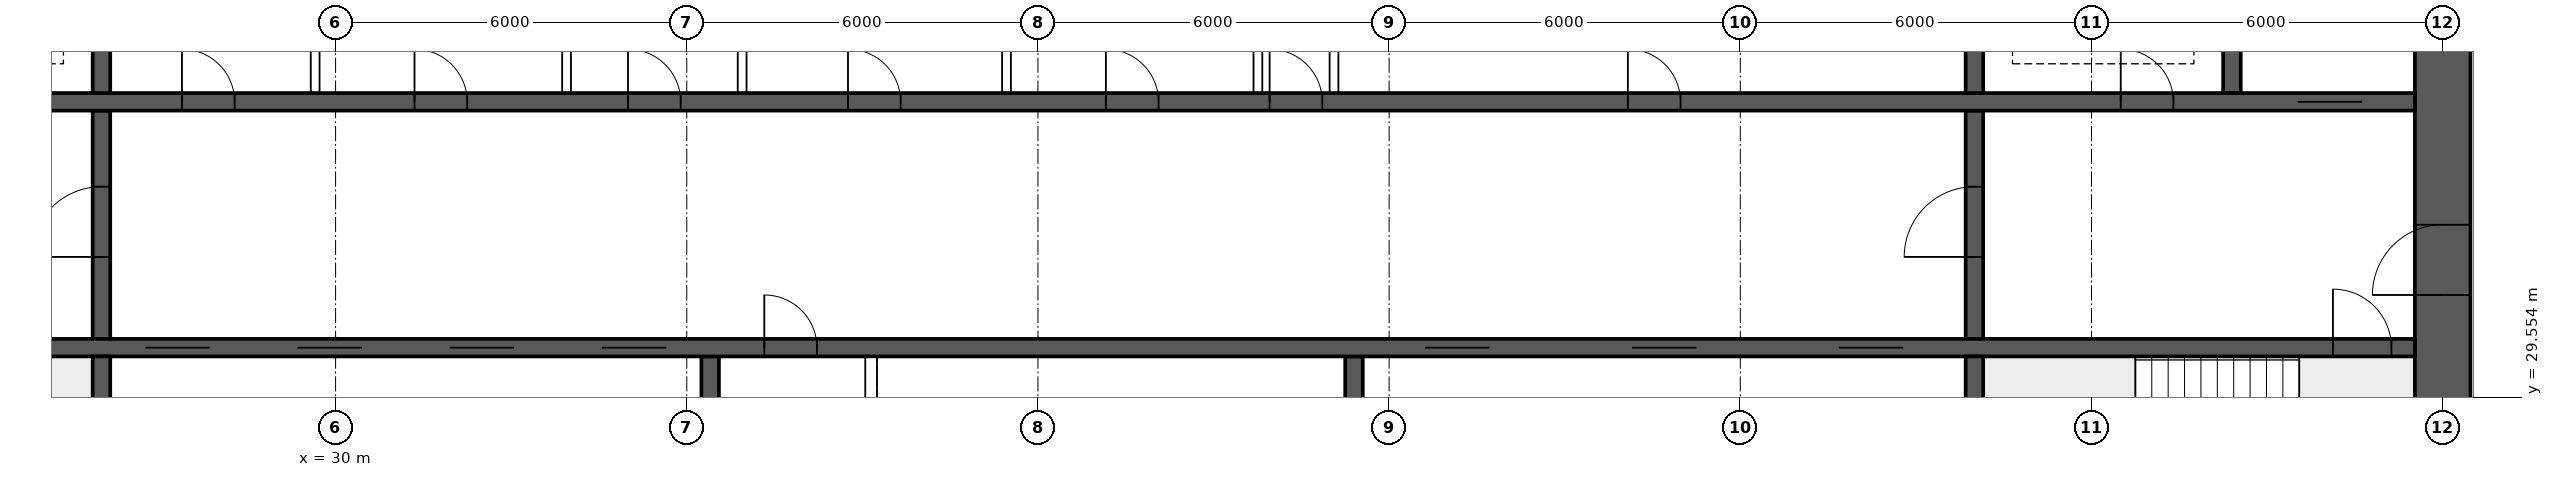
"""IFC4 building model, lengths in metres.
Left out: names, types, materials, properties, quantities, classifications, styles, units other than length and angle.
Written with IfcOpenShell. Run it as: python <this file> out.ifc"""

import sys

from ifc_helpers import new_model, si_unit, direction, frame, frame_2d, origin, place, context, subcontext, project, spatial, rectangle, extrude, element, fill, save


model = new_model("IFC4")
c1 = context("Model", 3, precision=1e-05, world=origin(), true_north=direction((0.0, 1.0)))
c2 = subcontext(c1, "Body", "Model", "MODEL_VIEW")
j1 = project(units=[si_unit("LENGTHUNIT", "METRE"), si_unit("PLANEANGLEUNIT", "RADIAN")], contexts=[c1])
p1 = place(None, origin())
s1 = spatial("IfcSite", under=j1, at=p1, CompositionType="ELEMENT")
p2 = place(p1, origin())
s2 = spatial("IfcBuilding", under=s1, at=p2, CompositionType="ELEMENT")
p3 = place(p2, frame((0.0, 0.0, 88.15)))
s3 = spatial("IfcBuildingStorey", under=s2, at=p3, CompositionType="ELEMENT", Elevation=88.15)
p4 = place(p3, frame((66.0, 26.275, 0.0), z_axis=(0.0, 0.0, 1.0), x_axis=(0.0, 1.0, 0.0)))
e1 = element("IfcWall", 1, at=p4, inside=s3, PredefinedType="SHEAR", context=c2, shape_type="SweptSolid", body=[
    extrude(rectangle(XDim=11.45, YDim=0.95, at=frame_2d((5.725, 0.0))), origin(), (0.0, 0.0, 1.0), 3.75),
])
p5 = place(p4, frame((5.025, 0.0, 0.0)))
e2 = element("IfcOpeningElement", 2, at=p5, cuts=e1, PredefinedType="OPENING", context=c2, shape_type="SweptSolid", body=[
    extrude(rectangle(XDim=1.2, YDim=2.1, at=frame_2d((0.6, 1.05))), frame((0.0, 0.485, 0.0), z_axis=(0.0, -1.0, 0.0), x_axis=(1.0, 0.0, 0.0)), (0.0, 0.0, 1.0), 0.97),
])
p6 = place(p3, frame((18.475, 30.4, 0.0), z_axis=(0.0, 0.0, 1.0), x_axis=(1.0, 0.0, 0.0)))
e3 = element("IfcWall", 3, at=p6, inside=s3, PredefinedType="SHEAR", context=c2, shape_type="SweptSolid", body=[
    extrude(rectangle(XDim=47.05, YDim=0.3, at=frame_2d((23.525, 0.0))), origin(), (0.0, 0.0, 1.0), 3.75),
])
p7 = place(p6, frame((0.4, 0.0, 0.0)))
e4 = element("IfcOpeningElement", 4, at=p7, cuts=e3, PredefinedType="OPENING", context=c2, shape_type="SweptSolid", body=[
    extrude(rectangle(XDim=1.0, YDim=2.1, at=frame_2d((0.5, 1.05))), frame((0.0, 0.16, 0.0), z_axis=(0.0, -1.0, 0.0), x_axis=(1.0, 0.0, 0.0)), (0.0, 0.0, 1.0), 0.32),
])
p8 = place(p6, frame((45.65, 0.0, 0.0)))
e5 = element("IfcOpeningElement", 5, at=p8, cuts=e3, PredefinedType="OPENING", context=c2, shape_type="SweptSolid", body=[
    extrude(rectangle(XDim=1.0, YDim=2.1, at=frame_2d((0.5, 1.05))), frame((0.0, 0.16, 0.0), z_axis=(0.0, -1.0, 0.0), x_axis=(1.0, 0.0, 0.0)), (0.0, 0.0, 1.0), 0.32),
])
p9 = place(p6, frame((8.275, 0.0, 0.0)))
e6 = element("IfcOpeningElement", 6, at=p9, cuts=e3, PredefinedType="OPENING", context=c2, shape_type="SweptSolid", body=[
    extrude(rectangle(XDim=1.1, YDim=2.1, at=frame_2d((0.55, 1.05))), frame((0.0, 0.16, 0.0), z_axis=(0.0, -1.0, 0.0), x_axis=(1.0, 0.0, 0.0)), (0.0, 0.0, 1.0), 0.32),
])
p10 = place(p6, frame((10.875, 0.0, 0.0)))
e7 = element("IfcOpeningElement", 7, at=p10, cuts=e3, PredefinedType="OPENING", context=c2, shape_type="SweptSolid", body=[
    extrude(rectangle(XDim=1.1, YDim=2.1, at=frame_2d((0.55, 1.05))), frame((0.0, 0.16, 0.0), z_axis=(0.0, -1.0, 0.0), x_axis=(1.0, 0.0, 0.0)), (0.0, 0.0, 1.0), 0.32),
])
p11 = place(p6, frame((13.475, 0.0, 0.0)))
e8 = element("IfcOpeningElement", 8, at=p11, cuts=e3, PredefinedType="OPENING", context=c2, shape_type="SweptSolid", body=[
    extrude(rectangle(XDim=1.1, YDim=2.1, at=frame_2d((0.55, 1.05))), frame((0.0, 0.16, 0.0), z_axis=(0.0, -1.0, 0.0), x_axis=(1.0, 0.0, 0.0)), (0.0, 0.0, 1.0), 0.32),
])
p12 = place(p6, frame((16.075, 0.0, 0.0)))
e9 = element("IfcOpeningElement", 9, at=p12, cuts=e3, PredefinedType="OPENING", context=c2, shape_type="SweptSolid", body=[
    extrude(rectangle(XDim=1.1, YDim=2.1, at=frame_2d((0.55, 1.05))), frame((0.0, 0.16, 0.0), z_axis=(0.0, -1.0, 0.0), x_axis=(1.0, 0.0, 0.0)), (0.0, 0.0, 1.0), 0.32),
])
p13 = place(p6, frame((18.85, 0.0, 0.0)))
e10 = element("IfcOpeningElement", 10, at=p13, cuts=e3, PredefinedType="OPENING", context=c2, shape_type="SweptSolid", body=[
    extrude(rectangle(XDim=0.9, YDim=2.1, at=frame_2d((0.45, 1.05))), frame((0.0, 0.16, 0.0), z_axis=(0.0, -1.0, 0.0), x_axis=(1.0, 0.0, 0.0)), (0.0, 0.0, 1.0), 0.32),
])
p14 = place(p6, frame((30.142, 0.0, 0.0)))
e11 = element("IfcOpeningElement", 11, at=p14, cuts=e3, PredefinedType="OPENING", context=c2, shape_type="SweptSolid", body=[
    extrude(rectangle(XDim=1.1, YDim=2.1, at=frame_2d((0.55, 1.05))), frame((0.0, 0.16, 0.0), z_axis=(0.0, -1.0, 0.0), x_axis=(1.0, 0.0, 0.0)), (0.0, 0.0, 1.0), 0.32),
])
p15 = place(p6, frame((33.675, 0.0, 0.0)))
e12 = element("IfcOpeningElement", 12, at=p15, cuts=e3, PredefinedType="OPENING", context=c2, shape_type="SweptSolid", body=[
    extrude(rectangle(XDim=1.1, YDim=2.1, at=frame_2d((0.55, 1.05))), frame((0.0, 0.16, 0.0), z_axis=(0.0, -1.0, 0.0), x_axis=(1.0, 0.0, 0.0)), (0.0, 0.0, 1.0), 0.32),
])
p16 = place(p6, frame((37.208, 0.0, 0.0)))
e13 = element("IfcOpeningElement", 13, at=p16, cuts=e3, PredefinedType="OPENING", context=c2, shape_type="SweptSolid", body=[
    extrude(rectangle(XDim=1.1, YDim=2.1, at=frame_2d((0.55, 1.05))), frame((0.0, 0.16, 0.0), z_axis=(0.0, -1.0, 0.0), x_axis=(1.0, 0.0, 0.0)), (0.0, 0.0, 1.0), 0.32),
])
p17 = place(p3, frame((18.475, 34.6, 0.0), z_axis=(0.0, 0.0, 1.0), x_axis=(1.0, 0.0, 0.0)))
e14 = element("IfcWall", 14, at=p17, inside=s3, PredefinedType="SHEAR", context=c2, shape_type="SweptSolid", body=[
    extrude(rectangle(XDim=47.05, YDim=0.3, at=frame_2d((23.525, 0.0))), origin(), (0.0, 0.0, 1.0), 3.75),
])
p18 = place(p17, frame((0.9, 0.0, 0.0)))
e15 = element("IfcOpeningElement", 15, at=p18, cuts=e14, PredefinedType="OPENING", context=c2, shape_type="SweptSolid", body=[
    extrude(rectangle(XDim=1.1, YDim=2.1, at=frame_2d((0.55, 1.05))), frame((0.0, 0.16, 0.0), z_axis=(0.0, -1.0, 0.0), x_axis=(1.0, 0.0, 0.0)), (0.0, 0.0, 1.0), 0.32),
])
p19 = place(p17, frame((45.05, 0.0, 0.0)))
e16 = element("IfcOpeningElement", 16, at=p19, cuts=e14, PredefinedType="OPENING", context=c2, shape_type="SweptSolid", body=[
    extrude(rectangle(XDim=1.1, YDim=2.1, at=frame_2d((0.55, 1.05))), frame((0.0, 0.16, 0.0), z_axis=(0.0, -1.0, 0.0), x_axis=(1.0, 0.0, 0.0)), (0.0, 0.0, 1.0), 0.32),
])
p20 = place(p17, frame((4.125, 0.0, 0.0)))
e17 = element("IfcOpeningElement", 17, at=p20, cuts=e14, PredefinedType="OPENING", context=c2, shape_type="SweptSolid", body=[
    extrude(rectangle(XDim=0.9, YDim=2.1, at=frame_2d((0.45, 1.05))), frame((0.0, 0.16, 0.0), z_axis=(0.0, -1.0, 0.0), x_axis=(1.0, 0.0, 0.0)), (0.0, 0.0, 1.0), 0.32),
])
p21 = place(p17, frame((42.025, 0.0, 0.0)))
e18 = element("IfcOpeningElement", 18, at=p21, cuts=e14, PredefinedType="OPENING", context=c2, shape_type="SweptSolid", body=[
    extrude(rectangle(XDim=0.9, YDim=2.1, at=frame_2d((0.45, 1.05))), frame((0.0, 0.16, 0.0), z_axis=(0.0, -1.0, 0.0), x_axis=(1.0, 0.0, 0.0)), (0.0, 0.0, 1.0), 0.32),
])
p22 = place(p17, frame((8.9, 0.0, 0.0)))
e19 = element("IfcOpeningElement", 19, at=p22, cuts=e14, PredefinedType="OPENING", context=c2, shape_type="SweptSolid", body=[
    extrude(rectangle(XDim=0.9, YDim=2.1, at=frame_2d((0.45, 1.05))), frame((0.0, 0.16, 0.0), z_axis=(0.0, -1.0, 0.0), x_axis=(1.0, 0.0, 0.0)), (0.0, 0.0, 1.0), 0.32),
])
p23 = place(p17, frame((12.874, 0.0, 0.0)))
e20 = element("IfcOpeningElement", 20, at=p23, cuts=e14, PredefinedType="OPENING", context=c2, shape_type="SweptSolid", body=[
    extrude(rectangle(XDim=0.9, YDim=2.1, at=frame_2d((0.45, 1.05))), frame((0.0, 0.16, 0.0), z_axis=(0.0, -1.0, 0.0), x_axis=(1.0, 0.0, 0.0)), (0.0, 0.0, 1.0), 0.32),
])
p24 = place(p17, frame((16.521, 0.0, 0.0)))
e21 = element("IfcOpeningElement", 21, at=p24, cuts=e14, PredefinedType="OPENING", context=c2, shape_type="SweptSolid", body=[
    extrude(rectangle(XDim=0.9, YDim=2.1, at=frame_2d((0.45, 1.05))), frame((0.0, 0.16, 0.0), z_axis=(0.0, -1.0, 0.0), x_axis=(1.0, 0.0, 0.0)), (0.0, 0.0, 1.0), 0.32),
])
p25 = place(p17, frame((20.28, 0.0, 0.0)))
e22 = element("IfcOpeningElement", 22, at=p25, cuts=e14, PredefinedType="OPENING", context=c2, shape_type="SweptSolid", body=[
    extrude(rectangle(XDim=0.9, YDim=2.1, at=frame_2d((0.45, 1.05))), frame((0.0, 0.16, 0.0), z_axis=(0.0, -1.0, 0.0), x_axis=(1.0, 0.0, 0.0)), (0.0, 0.0, 1.0), 0.32),
])
p26 = place(p17, frame((24.686, 0.0, 0.0)))
e23 = element("IfcOpeningElement", 23, at=p26, cuts=e14, PredefinedType="OPENING", context=c2, shape_type="SweptSolid", body=[
    extrude(rectangle(XDim=0.9, YDim=2.1, at=frame_2d((0.45, 1.05))), frame((0.0, 0.16, 0.0), z_axis=(0.0, -1.0, 0.0), x_axis=(1.0, 0.0, 0.0)), (0.0, 0.0, 1.0), 0.32),
])
p27 = place(p17, frame((27.483, 0.0, 0.0)))
e24 = element("IfcOpeningElement", 24, at=p27, cuts=e14, PredefinedType="OPENING", context=c2, shape_type="SweptSolid", body=[
    extrude(rectangle(XDim=0.9, YDim=2.1, at=frame_2d((0.45, 1.05))), frame((0.0, 0.16, 0.0), z_axis=(0.0, -1.0, 0.0), x_axis=(1.0, 0.0, 0.0)), (0.0, 0.0, 1.0), 0.32),
])
p28 = place(p17, frame((33.604, 0.0, 0.0)))
e25 = element("IfcOpeningElement", 25, at=p28, cuts=e14, PredefinedType="OPENING", context=c2, shape_type="SweptSolid", body=[
    extrude(rectangle(XDim=0.9, YDim=2.1, at=frame_2d((0.45, 1.05))), frame((0.0, 0.16, 0.0), z_axis=(0.0, -1.0, 0.0), x_axis=(1.0, 0.0, 0.0)), (0.0, 0.0, 1.0), 0.32),
])
for number, where, z_axis, x_axis in (
    (26, (26.0, 26.275, 0.0), (0.0, 0.0, 1.0), (0.0, 1.0, 0.0)),
    (27, (58.0, 26.275, 0.0), (0.0, 0.0, 1.0), (0.0, 1.0, 0.0)),
):
    element("IfcWall", number, at=place(p3, frame(where, z_axis=z_axis, x_axis=x_axis)), inside=s3, PredefinedType="SHEAR", context=c2, shape_type="SweptSolid", body=[
        extrude(rectangle(XDim=3.975, YDim=0.3, at=frame_2d((1.988, 0.0))), origin(), (0.0, 0.0, 1.0), 3.75),
    ])
p29 = place(p3, frame((26.0, 30.55, 0.0), z_axis=(0.0, 0.0, 1.0), x_axis=(0.0, 1.0, 0.0)))
e28 = element("IfcWall", 28, at=p29, inside=s3, PredefinedType="SHEAR", context=c2, shape_type="SweptSolid", body=[
    extrude(rectangle(XDim=3.9, YDim=0.3, at=frame_2d((1.95, 0.0))), origin(), (0.0, 0.0, 1.0), 3.75),
])
p30 = place(p29, frame((1.4, 0.0, 0.0)))
e29 = element("IfcOpeningElement", 29, at=p30, cuts=e28, PredefinedType="OPENING", context=c2, shape_type="SweptSolid", body=[
    extrude(rectangle(XDim=1.2, YDim=2.1, at=frame_2d((0.6, 1.05))), frame((0.0, 0.16, 0.0), z_axis=(0.0, -1.0, 0.0), x_axis=(1.0, 0.0, 0.0)), (0.0, 0.0, 1.0), 0.32),
])
p31 = place(p3, frame((58.0, 30.55, 0.0), z_axis=(0.0, 0.0, 1.0), x_axis=(0.0, 1.0, 0.0)))
e30 = element("IfcWall", 30, at=p31, inside=s3, PredefinedType="SHEAR", context=c2, shape_type="SweptSolid", body=[
    extrude(rectangle(XDim=3.9, YDim=0.3, at=frame_2d((1.95, 0.0))), origin(), (0.0, 0.0, 1.0), 3.75),
])
p32 = place(p31, frame((1.4, 0.0, 0.0)))
e31 = element("IfcOpeningElement", 31, at=p32, cuts=e30, PredefinedType="OPENING", context=c2, shape_type="SweptSolid", body=[
    extrude(rectangle(XDim=1.2, YDim=2.1, at=frame_2d((0.6, 1.05))), frame((0.0, 0.16, 0.0), z_axis=(0.0, -1.0, 0.0), x_axis=(1.0, 0.0, 0.0)), (0.0, 0.0, 1.0), 0.32),
])
for number, where, z_axis, x_axis in (
    (32, (62.4, 34.75, 0.0), (0.0, 0.0, 1.0), (0.0, 1.0, 0.0)),
    (33, (26.0, 34.75, 0.0), (0.0, 0.0, 1.0), (0.0, 1.0, 0.0)),
    (34, (58.0, 34.75, 0.0), (0.0, 0.0, 1.0), (0.0, 1.0, 0.0)),
):
    element("IfcWall", number, at=place(p3, frame(where, z_axis=z_axis, x_axis=x_axis)), inside=s3, PredefinedType="SHEAR", context=c2, shape_type="SweptSolid", body=[
        extrude(rectangle(XDim=2.975, YDim=0.3, at=frame_2d((1.488, 0.0))), origin(), (0.0, 0.0, 1.0), 3.75),
    ])
for number, where, z_axis, x_axis in (
    (35, (36.4, 26.275, 0.0), (0.0, 0.0, 1.0), (0.0, 1.0, 0.0)),
    (36, (47.4, 26.275, 0.0), (0.0, 0.0, 1.0), (0.0, 1.0, 0.0)),
):
    element("IfcWall", number, at=place(p3, frame(where, z_axis=z_axis, x_axis=x_axis)), inside=s3, PredefinedType="SHEAR", context=c2, shape_type="SweptSolid", body=[
        extrude(rectangle(XDim=3.975, YDim=0.3, at=frame_2d((1.988, 0.0))), origin(), (0.0, 0.0, 1.0), 3.75),
    ])
for number, where, z_axis, x_axis in (
    (37, (29.651, 34.75, 0.0), (0.0, 0.0, 1.0), (0.0, 1.0, 0.0)),
    (38, (33.946, 34.75, 0.0), (0.0, 0.0, 1.0), (0.0, 1.0, 0.0)),
    (39, (36.946, 34.75, 0.0), (0.0, 0.0, 1.0), (0.0, 1.0, 0.0)),
    (40, (41.463, 34.75, 0.0), (0.0, 0.0, 1.0), (0.0, 1.0, 0.0)),
    (41, (45.758, 34.75, 0.0), (0.0, 0.0, 1.0), (0.0, 1.0, 0.0)),
    (42, (47.058, 34.75, 0.0), (0.0, 0.0, 1.0), (0.0, 1.0, 0.0)),
):
    element("IfcWall", number, at=place(p3, frame(where, z_axis=z_axis, x_axis=x_axis)), inside=s3, PredefinedType="SOLIDWALL", context=c2, shape_type="SweptSolid", body=[
        extrude(rectangle(XDim=2.975, YDim=0.15, at=frame_2d((1.488, 0.0))), origin(), (0.0, 0.0, 1.0), 3.5),
    ])
p33 = place(p3, frame((39.15, 26.275, 0.0), z_axis=(0.0, 0.0, 1.0), x_axis=(0.0, 1.0, 0.0)))
e43 = element("IfcWall", 43, at=p33, inside=s3, PredefinedType="SOLIDWALL", context=c2, shape_type="SweptSolid", body=[
    extrude(rectangle(XDim=3.975, YDim=0.2, at=frame_2d((1.988, 0.0))), origin(), (0.0, 0.0, 1.0), 3.5),
])
p34 = place(p5, origin())
e44 = element("IfcDoor", 44, at=p34, inside=s3, OperationType="SINGLE_SWING_LEFT", PredefinedType="DOOR", context=c2, shape_type="SweptSolid", body=[
    extrude(rectangle(XDim=1.2, YDim=2.1, at=frame_2d((0.6, 1.05))), frame((0.0, 0.025, 0.0), z_axis=(0.0, -1.0, 0.0), x_axis=(1.0, 0.0, 0.0)), (0.0, 0.0, 1.0), 0.05),
])
fill(e2, e44)
p35 = place(p8, origin())
e45 = element("IfcDoor", 45, at=p35, inside=s3, OperationType="SINGLE_SWING_LEFT", PredefinedType="DOOR", context=c2, shape_type="SweptSolid", body=[
    extrude(rectangle(XDim=1.0, YDim=2.1, at=frame_2d((0.5, 1.05))), frame((0.0, 0.025, 0.0), z_axis=(0.0, -1.0, 0.0), x_axis=(1.0, 0.0, 0.0)), (0.0, 0.0, 1.0), 0.05),
])
fill(e5, e45)
p36 = place(p19, origin())
e46 = element("IfcDoor", 46, at=p36, inside=s3, OperationType="DOUBLE_DOOR_SLIDING", PredefinedType="DOOR", context=c2, shape_type="SweptSolid", body=[
    extrude(rectangle(XDim=1.1, YDim=2.1, at=frame_2d((0.55, 1.05))), frame((0.0, 0.025, 0.0), z_axis=(0.0, -1.0, 0.0), x_axis=(1.0, 0.0, 0.0)), (0.0, 0.0, 1.0), 0.05),
])
fill(e16, e46)
p37 = place(p21, origin())
e47 = element("IfcDoor", 47, at=p37, inside=s3, OperationType="SINGLE_SWING_LEFT", PredefinedType="DOOR", context=c2, shape_type="SweptSolid", body=[
    extrude(rectangle(XDim=0.9, YDim=2.1, at=frame_2d((0.45, 1.05))), frame((0.0, 0.025, 0.0), z_axis=(0.0, -1.0, 0.0), x_axis=(1.0, 0.0, 0.0)), (0.0, 0.0, 1.0), 0.05),
])
fill(e18, e47)
p38 = place(p30, origin())
e48 = element("IfcDoor", 48, at=p38, inside=s3, OperationType="SINGLE_SWING_LEFT", PredefinedType="DOOR", context=c2, shape_type="SweptSolid", body=[
    extrude(rectangle(XDim=1.2, YDim=2.1, at=frame_2d((0.6, 1.05))), frame((0.0, 0.025, 0.0), z_axis=(0.0, -1.0, 0.0), x_axis=(1.0, 0.0, 0.0)), (0.0, 0.0, 1.0), 0.05),
])
fill(e29, e48)
p39 = place(p32, origin())
e49 = element("IfcDoor", 49, at=p39, inside=s3, OperationType="SINGLE_SWING_LEFT", PredefinedType="DOOR", context=c2, shape_type="SweptSolid", body=[
    extrude(rectangle(XDim=1.2, YDim=2.1, at=frame_2d((0.6, 1.05))), frame((0.0, 0.025, 0.0), z_axis=(0.0, -1.0, 0.0), x_axis=(1.0, 0.0, 0.0)), (0.0, 0.0, 1.0), 0.05),
])
fill(e31, e49)
p40 = place(p22, origin())
e50 = element("IfcDoor", 50, at=p40, inside=s3, OperationType="SINGLE_SWING_LEFT", PredefinedType="DOOR", context=c2, shape_type="SweptSolid", body=[
    extrude(rectangle(XDim=0.9, YDim=2.1, at=frame_2d((0.45, 1.05))), frame((0.0, 0.025, 0.0), z_axis=(0.0, -1.0, 0.0), x_axis=(1.0, 0.0, 0.0)), (0.0, 0.0, 1.0), 0.05),
])
fill(e19, e50)
p41 = place(p23, origin())
e51 = element("IfcDoor", 51, at=p41, inside=s3, OperationType="SINGLE_SWING_LEFT", PredefinedType="DOOR", context=c2, shape_type="SweptSolid", body=[
    extrude(rectangle(XDim=0.9, YDim=2.1, at=frame_2d((0.45, 1.05))), frame((0.0, 0.025, 0.0), z_axis=(0.0, -1.0, 0.0), x_axis=(1.0, 0.0, 0.0)), (0.0, 0.0, 1.0), 0.05),
])
fill(e20, e51)
p42 = place(p24, origin())
e52 = element("IfcDoor", 52, at=p42, inside=s3, OperationType="SINGLE_SWING_LEFT", PredefinedType="DOOR", context=c2, shape_type="SweptSolid", body=[
    extrude(rectangle(XDim=0.9, YDim=2.1, at=frame_2d((0.45, 1.05))), frame((0.0, 0.025, 0.0), z_axis=(0.0, -1.0, 0.0), x_axis=(1.0, 0.0, 0.0)), (0.0, 0.0, 1.0), 0.05),
])
fill(e21, e52)
p43 = place(p25, origin())
e53 = element("IfcDoor", 53, at=p43, inside=s3, OperationType="SINGLE_SWING_LEFT", PredefinedType="DOOR", context=c2, shape_type="SweptSolid", body=[
    extrude(rectangle(XDim=0.9, YDim=2.1, at=frame_2d((0.45, 1.05))), frame((0.0, 0.025, 0.0), z_axis=(0.0, -1.0, 0.0), x_axis=(1.0, 0.0, 0.0)), (0.0, 0.0, 1.0), 0.05),
])
fill(e22, e53)
p44 = place(p26, origin())
e54 = element("IfcDoor", 54, at=p44, inside=s3, OperationType="SINGLE_SWING_LEFT", PredefinedType="DOOR", context=c2, shape_type="SweptSolid", body=[
    extrude(rectangle(XDim=0.9, YDim=2.1, at=frame_2d((0.45, 1.05))), frame((0.0, 0.025, 0.0), z_axis=(0.0, -1.0, 0.0), x_axis=(1.0, 0.0, 0.0)), (0.0, 0.0, 1.0), 0.05),
])
fill(e23, e54)
p45 = place(p27, origin())
e55 = element("IfcDoor", 55, at=p45, inside=s3, OperationType="SINGLE_SWING_LEFT", PredefinedType="DOOR", context=c2, shape_type="SweptSolid", body=[
    extrude(rectangle(XDim=0.9, YDim=2.1, at=frame_2d((0.45, 1.05))), frame((0.0, 0.025, 0.0), z_axis=(0.0, -1.0, 0.0), x_axis=(1.0, 0.0, 0.0)), (0.0, 0.0, 1.0), 0.05),
])
fill(e24, e55)
p46 = place(p28, origin())
e56 = element("IfcDoor", 56, at=p46, inside=s3, OperationType="SINGLE_SWING_LEFT", PredefinedType="DOOR", context=c2, shape_type="SweptSolid", body=[
    extrude(rectangle(XDim=0.9, YDim=2.1, at=frame_2d((0.45, 1.05))), frame((0.0, 0.025, 0.0), z_axis=(0.0, -1.0, 0.0), x_axis=(1.0, 0.0, 0.0)), (0.0, 0.0, 1.0), 0.05),
])
fill(e25, e56)
p47 = place(p9, origin())
e57 = element("IfcDoor", 57, at=p47, inside=s3, OperationType="DOUBLE_DOOR_SLIDING", PredefinedType="DOOR", context=c2, shape_type="SweptSolid", body=[
    extrude(rectangle(XDim=1.1, YDim=2.1, at=frame_2d((0.55, 1.05))), frame((0.0, 0.025, 0.0), z_axis=(0.0, -1.0, 0.0), x_axis=(1.0, 0.0, 0.0)), (0.0, 0.0, 1.0), 0.05),
])
fill(e6, e57)
p48 = place(p10, origin())
e58 = element("IfcDoor", 58, at=p48, inside=s3, OperationType="DOUBLE_DOOR_SLIDING", PredefinedType="DOOR", context=c2, shape_type="SweptSolid", body=[
    extrude(rectangle(XDim=1.1, YDim=2.1, at=frame_2d((0.55, 1.05))), frame((0.0, 0.025, 0.0), z_axis=(0.0, -1.0, 0.0), x_axis=(1.0, 0.0, 0.0)), (0.0, 0.0, 1.0), 0.05),
])
fill(e7, e58)
p49 = place(p11, origin())
e59 = element("IfcDoor", 59, at=p49, inside=s3, OperationType="DOUBLE_DOOR_SLIDING", PredefinedType="DOOR", context=c2, shape_type="SweptSolid", body=[
    extrude(rectangle(XDim=1.1, YDim=2.1, at=frame_2d((0.55, 1.05))), frame((0.0, 0.025, 0.0), z_axis=(0.0, -1.0, 0.0), x_axis=(1.0, 0.0, 0.0)), (0.0, 0.0, 1.0), 0.05),
])
fill(e8, e59)
p50 = place(p12, origin())
e60 = element("IfcDoor", 60, at=p50, inside=s3, OperationType="DOUBLE_DOOR_SLIDING", PredefinedType="DOOR", context=c2, shape_type="SweptSolid", body=[
    extrude(rectangle(XDim=1.1, YDim=2.1, at=frame_2d((0.55, 1.05))), frame((0.0, 0.025, 0.0), z_axis=(0.0, -1.0, 0.0), x_axis=(1.0, 0.0, 0.0)), (0.0, 0.0, 1.0), 0.05),
])
fill(e9, e60)
p51 = place(p13, origin())
e61 = element("IfcDoor", 61, at=p51, inside=s3, OperationType="SINGLE_SWING_LEFT", PredefinedType="DOOR", context=c2, shape_type="SweptSolid", body=[
    extrude(rectangle(XDim=0.9, YDim=2.1, at=frame_2d((0.45, 1.05))), frame((0.0, 0.025, 0.0), z_axis=(0.0, -1.0, 0.0), x_axis=(1.0, 0.0, 0.0)), (0.0, 0.0, 1.0), 0.05),
])
fill(e10, e61)
p52 = place(p14, origin())
e62 = element("IfcDoor", 62, at=p52, inside=s3, OperationType="DOUBLE_DOOR_SLIDING", PredefinedType="DOOR", context=c2, shape_type="SweptSolid", body=[
    extrude(rectangle(XDim=1.1, YDim=2.1, at=frame_2d((0.55, 1.05))), frame((0.0, 0.025, 0.0), z_axis=(0.0, -1.0, 0.0), x_axis=(1.0, 0.0, 0.0)), (0.0, 0.0, 1.0), 0.05),
])
fill(e11, e62)
p53 = place(p15, origin())
e63 = element("IfcDoor", 63, at=p53, inside=s3, OperationType="DOUBLE_DOOR_SLIDING", PredefinedType="DOOR", context=c2, shape_type="SweptSolid", body=[
    extrude(rectangle(XDim=1.1, YDim=2.1, at=frame_2d((0.55, 1.05))), frame((0.0, 0.025, 0.0), z_axis=(0.0, -1.0, 0.0), x_axis=(1.0, 0.0, 0.0)), (0.0, 0.0, 1.0), 0.05),
])
fill(e12, e63)
p54 = place(p16, origin())
e64 = element("IfcDoor", 64, at=p54, inside=s3, OperationType="DOUBLE_DOOR_SLIDING", PredefinedType="DOOR", context=c2, shape_type="SweptSolid", body=[
    extrude(rectangle(XDim=1.1, YDim=2.1, at=frame_2d((0.55, 1.05))), frame((0.0, 0.025, 0.0), z_axis=(0.0, -1.0, 0.0), x_axis=(1.0, 0.0, 0.0)), (0.0, 0.0, 1.0), 0.05),
])
fill(e13, e64)
save(model, sys.argv[1])
